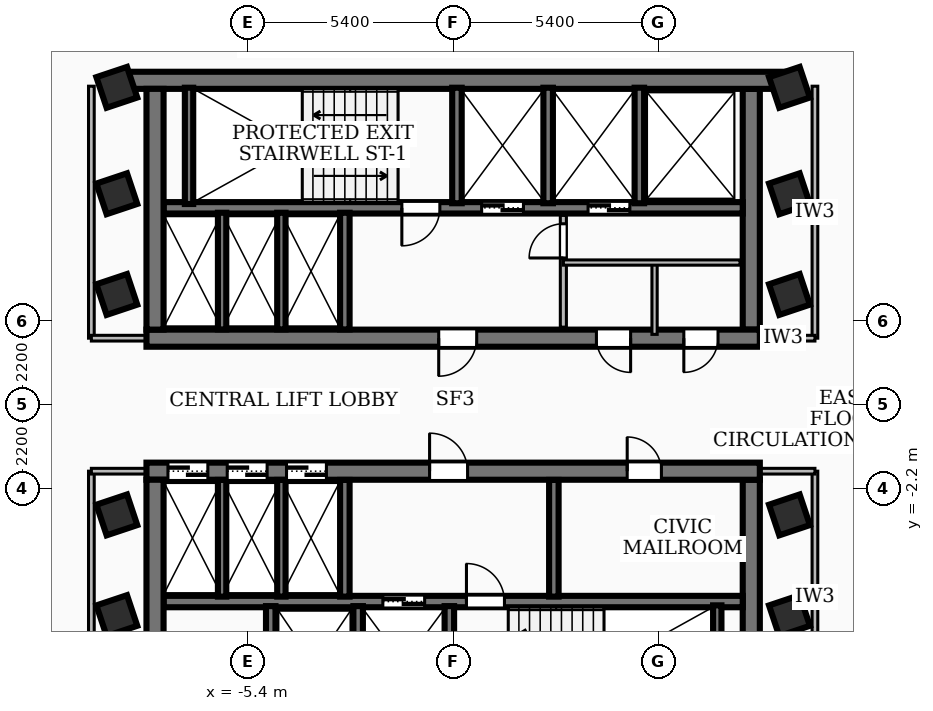
"""IFC4 building model, lengths in metres.
Left out: names, types, materials, properties, quantities, classifications, styles, units other than length and angle.
Written with IfcOpenShell. Run it as: python <this file> out.ifc"""

import sys

from ifc_helpers import new_model, si_unit, direction, frame, frame_2d, origin, origin_2d, place, context, subcontext, project, spatial, rectangle, extrude, element, fill, save


model = new_model("IFC4")
c1 = context("Model", 3, precision=1e-05, world=origin(), true_north=direction((0.0, 1.0)))
c2 = subcontext(c1, "Body", "Model", "MODEL_VIEW")
j1 = project(units=[si_unit("LENGTHUNIT", "METRE"), si_unit("PLANEANGLEUNIT", "RADIAN")], contexts=[c1])
p1 = place(None, origin())
s1 = spatial("IfcSite", under=j1, at=p1, CompositionType="ELEMENT")
p2 = place(p1, origin())
s2 = spatial("IfcBuilding", under=s1, at=p2, CompositionType="ELEMENT")
p3 = place(p2, frame((0.0, 0.0, 155.88)))
s3 = spatial("IfcBuildingStorey", under=s2, at=p3, CompositionType="ELEMENT", Elevation=155.88)
p4 = place(p3, frame((-8.78, 8.535, 0.0), z_axis=(0.0, 0.0, 1.0), x_axis=(1.0, 0.0, 0.0)))
e1 = element("IfcWall", 1, at=p4, inside=s3, PredefinedType="SHEAR", context=c2, shape_type="SweptSolid", body=[
    extrude(rectangle(XDim=17.56, YDim=0.45, at=frame_2d((8.78, 0.0))), origin(), (0.0, 0.0, 1.0), 3.34),
])
p5 = place(p3, frame((8.07, 1.75, 0.0), z_axis=(0.0, 0.0, 1.0), x_axis=(-1.0, 0.0, 0.0)))
e2 = element("IfcWall", 2, at=p5, inside=s3, PredefinedType="SHEAR", context=c2, shape_type="SweptSolid", body=[
    extrude(rectangle(XDim=16.14, YDim=0.45, at=frame_2d((8.07, 0.0))), origin(), (0.0, 0.0, 1.0), 3.34),
])
p6 = place(p5, frame((7.45, 0.0, 0.0)))
e3 = element("IfcOpeningElement", 3, at=p6, cuts=e2, PredefinedType="OPENING", context=c2, shape_type="SweptSolid", body=[
    extrude(rectangle(XDim=1.0, YDim=2.1, at=frame_2d((0.5, 1.05))), frame((0.0, 0.235, 0.0), z_axis=(0.0, -1.0, 0.0), x_axis=(1.0, 0.0, 0.0)), (0.0, 0.0, 1.0), 0.47),
])
p7 = place(p5, frame((3.4, 0.0, 0.0)))
e4 = element("IfcOpeningElement", 4, at=p7, cuts=e2, PredefinedType="OPENING", context=c2, shape_type="SweptSolid", body=[
    extrude(rectangle(XDim=0.9, YDim=2.06, at=frame_2d((0.45, 1.03))), frame((0.0, 0.235, 0.0), z_axis=(0.0, -1.0, 0.0), x_axis=(1.0, 0.0, 0.0)), (0.0, 0.0, 1.0), 0.47),
])
p8 = place(p5, frame((1.1, 0.0, 0.0)))
e5 = element("IfcOpeningElement", 5, at=p8, cuts=e2, PredefinedType="OPENING", context=c2, shape_type="SweptSolid", body=[
    extrude(rectangle(XDim=0.9, YDim=2.06, at=frame_2d((0.45, 1.03))), frame((0.0, 0.235, 0.0), z_axis=(0.0, -1.0, 0.0), x_axis=(1.0, 0.0, 0.0)), (0.0, 0.0, 1.0), 0.47),
])
for number, where, z_axis, x_axis in (
    (6, (-7.845, 1.975, 0.0), (0.0, 0.0, 1.0), (0.0, 1.0, 0.0)),
    (7, (7.845, 8.31, 0.0), (0.0, 0.0, 1.0), (0.0, -1.0, 0.0)),
):
    element("IfcWall", number, at=place(p3, frame(where, z_axis=z_axis, x_axis=x_axis)), inside=s3, PredefinedType="SHEAR", context=c2, shape_type="SweptSolid", body=[
        extrude(rectangle(XDim=6.335, YDim=0.45, at=frame_2d((3.167, 0.0))), origin(), (0.0, 0.0, 1.0), 3.34),
    ])
p9 = place(p3, frame((7.62, 5.18, 0.0), z_axis=(0.0, 0.0, 1.0), x_axis=(-1.0, 0.0, 0.0)))
e8 = element("IfcWall", 8, at=p9, inside=s3, PredefinedType="SOLIDWALL", context=c2, shape_type="SweptSolid", body=[
    extrude(rectangle(XDim=15.24, YDim=0.3, at=frame_2d((7.62, 0.0))), origin(), (0.0, 0.0, 1.0), 3.34),
])
p10 = place(p9, frame((5.77, 0.0, 0.0)))
e9 = element("IfcOpeningElement", 9, at=p10, cuts=e8, PredefinedType="OPENING", context=c2, shape_type="SweptSolid", body=[
    extrude(rectangle(XDim=1.1, YDim=2.15, at=frame_2d((0.55, 1.075))), frame((0.0, 0.16, 0.0), z_axis=(0.0, -1.0, 0.0), x_axis=(1.0, 0.0, 0.0)), (0.0, 0.0, 1.0), 0.32),
])
p11 = place(p9, frame((2.97, 0.0, 0.0)))
e10 = element("IfcOpeningElement", 10, at=p11, cuts=e8, PredefinedType="OPENING", context=c2, shape_type="SweptSolid", body=[
    extrude(rectangle(XDim=1.1, YDim=2.15, at=frame_2d((0.55, 1.075))), frame((0.0, 0.16, 0.0), z_axis=(0.0, -1.0, 0.0), x_axis=(1.0, 0.0, 0.0)), (0.0, 0.0, 1.0), 0.32),
])
p12 = place(p9, frame((7.97, 0.0, 0.0)))
e11 = element("IfcOpeningElement", 11, at=p12, cuts=e8, PredefinedType="OPENING", context=c2, shape_type="SweptSolid", body=[
    extrude(rectangle(XDim=1.0, YDim=2.1, at=frame_2d((0.5, 1.05))), frame((0.0, 0.16, 0.0), z_axis=(0.0, -1.0, 0.0), x_axis=(1.0, 0.0, 0.0)), (0.0, 0.0, 1.0), 0.32),
])
p13 = place(p3, frame((-8.07, -1.75, 0.0), z_axis=(0.0, 0.0, 1.0), x_axis=(1.0, 0.0, 0.0)))
e12 = element("IfcWall", 12, at=p13, inside=s3, PredefinedType="SHEAR", context=c2, shape_type="SweptSolid", body=[
    extrude(rectangle(XDim=16.14, YDim=0.45, at=frame_2d((8.07, 0.0))), origin(), (0.0, 0.0, 1.0), 3.34),
])
p14 = place(p13, frame((7.45, 0.0, 0.0)))
e13 = element("IfcOpeningElement", 13, at=p14, cuts=e12, PredefinedType="OPENING", context=c2, shape_type="SweptSolid", body=[
    extrude(rectangle(XDim=1.0, YDim=2.1, at=frame_2d((0.5, 1.05))), frame((0.0, 0.235, 0.0), z_axis=(0.0, -1.0, 0.0), x_axis=(1.0, 0.0, 0.0)), (0.0, 0.0, 1.0), 0.47),
])
p15 = place(p13, frame((12.65, 0.0, 0.0)))
e14 = element("IfcOpeningElement", 14, at=p15, cuts=e12, PredefinedType="OPENING", context=c2, shape_type="SweptSolid", body=[
    extrude(rectangle(XDim=0.9, YDim=2.06, at=frame_2d((0.45, 1.03))), frame((0.0, 0.235, 0.0), z_axis=(0.0, -1.0, 0.0), x_axis=(1.0, 0.0, 0.0)), (0.0, 0.0, 1.0), 0.47),
])
p16 = place(p13, frame((0.565, 0.0, 0.0)))
e15 = element("IfcOpeningElement", 15, at=p16, cuts=e12, PredefinedType="OPENING", context=c2, shape_type="SweptSolid", body=[
    extrude(rectangle(XDim=1.05, YDim=2.15, at=frame_2d((0.525, 1.075))), frame((0.0, 0.235, 0.0), z_axis=(0.0, -1.0, 0.0), x_axis=(1.0, 0.0, 0.0)), (0.0, 0.0, 1.0), 0.47),
])
p17 = place(p13, frame((2.125, 0.0, 0.0)))
e16 = element("IfcOpeningElement", 16, at=p17, cuts=e12, PredefinedType="OPENING", context=c2, shape_type="SweptSolid", body=[
    extrude(rectangle(XDim=1.05, YDim=2.15, at=frame_2d((0.525, 1.075))), frame((0.0, 0.235, 0.0), z_axis=(0.0, -1.0, 0.0), x_axis=(1.0, 0.0, 0.0)), (0.0, 0.0, 1.0), 0.47),
])
p18 = place(p13, frame((3.685, 0.0, 0.0)))
e17 = element("IfcOpeningElement", 17, at=p18, cuts=e12, PredefinedType="OPENING", context=c2, shape_type="SweptSolid", body=[
    extrude(rectangle(XDim=1.05, YDim=2.15, at=frame_2d((0.525, 1.075))), frame((0.0, 0.235, 0.0), z_axis=(0.0, -1.0, 0.0), x_axis=(1.0, 0.0, 0.0)), (0.0, 0.0, 1.0), 0.47),
])
for number, where, z_axis, x_axis in (
    (18, (-7.845, -8.31, 0.0), (0.0, 0.0, 1.0), (0.0, 1.0, 0.0)),
    (19, (7.845, -1.975, 0.0), (0.0, 0.0, 1.0), (0.0, -1.0, 0.0)),
):
    element("IfcWall", number, at=place(p3, frame(where, z_axis=z_axis, x_axis=x_axis)), inside=s3, PredefinedType="SHEAR", context=c2, shape_type="SweptSolid", body=[
        extrude(rectangle(XDim=6.335, YDim=0.45, at=frame_2d((3.167, 0.0))), origin(), (0.0, 0.0, 1.0), 3.34),
    ])
p19 = place(p3, frame((-7.62, -5.18, 0.0), z_axis=(0.0, 0.0, 1.0), x_axis=(1.0, 0.0, 0.0)))
e20 = element("IfcWall", 20, at=p19, inside=s3, PredefinedType="SOLIDWALL", context=c2, shape_type="SweptSolid", body=[
    extrude(rectangle(XDim=15.24, YDim=0.3, at=frame_2d((7.62, 0.0))), origin(), (0.0, 0.0, 1.0), 3.34),
])
p20 = place(p19, frame((5.77, 0.0, 0.0)))
e21 = element("IfcOpeningElement", 21, at=p20, cuts=e20, PredefinedType="OPENING", context=c2, shape_type="SweptSolid", body=[
    extrude(rectangle(XDim=1.1, YDim=2.15, at=frame_2d((0.55, 1.075))), frame((0.0, 0.16, 0.0), z_axis=(0.0, -1.0, 0.0), x_axis=(1.0, 0.0, 0.0)), (0.0, 0.0, 1.0), 0.32),
])
p21 = place(p19, frame((7.97, 0.0, 0.0)))
e22 = element("IfcOpeningElement", 22, at=p21, cuts=e20, PredefinedType="OPENING", context=c2, shape_type="SweptSolid", body=[
    extrude(rectangle(XDim=1.0, YDim=2.1, at=frame_2d((0.5, 1.05))), frame((0.0, 0.16, 0.0), z_axis=(0.0, -1.0, 0.0), x_axis=(1.0, 0.0, 0.0)), (0.0, 0.0, 1.0), 0.32),
])
for number, where, z_axis, x_axis in (
    (23, (-6.95, 5.28, 0.0), (0.0, 0.0, 1.0), (0.0, 1.0, 0.0)),
    (24, (6.95, -8.34, 0.0), (0.0, 0.0, 1.0), (0.0, 1.0, 0.0)),
):
    element("IfcWall", number, at=place(p3, frame(where, z_axis=z_axis, x_axis=x_axis)), inside=s3, PredefinedType="SOLIDWALL", context=c2, shape_type="SweptSolid", body=[
        extrude(rectangle(XDim=3.06, YDim=0.22, at=frame_2d((1.53, 0.0))), origin(), (0.0, 0.0, 1.0), 3.34),
    ])
for number, where, z_axis, x_axis in (
    (25, (0.1, 5.3, 0.0), (0.0, 0.0, 1.0), (0.0, 1.0, 0.0)),
    (26, (2.5, 5.3, 0.0), (0.0, 0.0, 1.0), (0.0, 1.0, 0.0)),
    (27, (4.9, 5.3, 0.0), (0.0, 0.0, 1.0), (0.0, 1.0, 0.0)),
):
    element("IfcWall", number, at=place(p3, frame(where, z_axis=z_axis, x_axis=x_axis)), inside=s3, PredefinedType="SOLIDWALL", context=c2, shape_type="SweptSolid", body=[
        extrude(rectangle(XDim=3.04, YDim=0.25, at=frame_2d((1.52, 0.0))), origin(), (0.0, 0.0, 1.0), 3.34),
    ])
p22 = place(p3, frame((-2.85, 1.98, 0.0), z_axis=(0.0, 0.0, 1.0), x_axis=(0.0, 1.0, 0.0)))
e28 = element("IfcWall", 28, at=p22, inside=s3, PredefinedType="SOLIDWALL", context=c2, shape_type="SweptSolid", body=[
    extrude(rectangle(XDim=3.07, YDim=0.25, at=frame_2d((1.535, 0.0))), origin(), (0.0, 0.0, 1.0), 3.34),
])
for number, where, z_axis, x_axis in (
    (29, (-0.1, -8.34, 0.0), (0.0, 0.0, 1.0), (0.0, 1.0, 0.0)),
    (30, (-2.5, -8.34, 0.0), (0.0, 0.0, 1.0), (0.0, 1.0, 0.0)),
    (31, (-4.8, -8.34, 0.0), (0.0, 0.0, 1.0), (0.0, 1.0, 0.0)),
):
    element("IfcWall", number, at=place(p3, frame(where, z_axis=z_axis, x_axis=x_axis)), inside=s3, PredefinedType="SOLIDWALL", context=c2, shape_type="SweptSolid", body=[
        extrude(rectangle(XDim=3.04, YDim=0.25, at=frame_2d((1.52, 0.0))), origin(), (0.0, 0.0, 1.0), 3.34),
    ])
for number, where, z_axis, x_axis in (
    (32, (-2.85, -5.05, 0.0), (0.0, 0.0, 1.0), (0.0, 1.0, 0.0)),
    (33, (2.65, -5.05, 0.0), (0.0, 0.0, 1.0), (0.0, 1.0, 0.0)),
):
    element("IfcWall", number, at=place(p3, frame(where, z_axis=z_axis, x_axis=x_axis)), inside=s3, PredefinedType="SOLIDWALL", context=c2, shape_type="SweptSolid", body=[
        extrude(rectangle(XDim=3.07, YDim=0.25, at=frame_2d((1.535, 0.0))), origin(), (0.0, 0.0, 1.0), 3.34),
    ])
for number, where, z_axis, x_axis in (
    (34, (-6.08, 1.98, 0.0), (0.0, 0.0, 1.0), (0.0, 1.0, 0.0)),
    (35, (-4.52, 1.98, 0.0), (0.0, 0.0, 1.0), (0.0, 1.0, 0.0)),
    (36, (-6.08, -5.05, 0.0), (0.0, 0.0, 1.0), (0.0, 1.0, 0.0)),
    (37, (-4.52, -5.05, 0.0), (0.0, 0.0, 1.0), (0.0, 1.0, 0.0)),
):
    element("IfcWall", number, at=place(p3, frame(where, z_axis=z_axis, x_axis=x_axis)), inside=s3, PredefinedType="SOLIDWALL", context=c2, shape_type="SweptSolid", body=[
        extrude(rectangle(XDim=3.07, YDim=0.22, at=frame_2d((1.535, 0.0))), origin(), (0.0, 0.0, 1.0), 3.34),
    ])
for number, where, z_axis, x_axis in (
    (38, (-8.85, -5.55, 0.0), (0.0, 0.0, 1.0), (0.948, 0.317, 0.0)),
    (39, (-8.85, -2.9, 0.0), (0.0, 0.0, 1.0), (0.948, 0.317, 0.0)),
    (40, (-8.85, 2.9, 0.0), (0.0, 0.0, 1.0), (0.948, 0.317, 0.0)),
    (41, (-8.85, 5.55, 0.0), (0.0, 0.0, 1.0), (0.948, 0.317, 0.0)),
    (42, (8.85, -5.55, 0.0), (0.0, 0.0, 1.0), (0.948, 0.317, 0.0)),
    (43, (8.85, -2.9, 0.0), (0.0, 0.0, 1.0), (0.948, 0.317, 0.0)),
    (44, (8.85, 2.9, 0.0), (0.0, 0.0, 1.0), (0.948, 0.317, 0.0)),
    (45, (8.85, 5.55, 0.0), (0.0, 0.0, 1.0), (0.948, 0.317, 0.0)),
    (46, (-8.85, 8.35, 0.0), (0.0, 0.0, 1.0), (0.948, 0.317, 0.0)),
    (47, (8.85, 8.35, 0.0), (0.0, 0.0, 1.0), (0.948, 0.317, 0.0)),
):
    element("IfcColumn", number, at=place(p3, frame(where, z_axis=z_axis, x_axis=x_axis)), inside=s3, PredefinedType="COLUMN", context=c2, shape_type="SweptSolid", body=[
        extrude(rectangle(XDim=0.85, YDim=0.85, at=origin_2d()), origin(), (0.0, 0.0, 1.0), 3.6),
    ])
p23 = place(p3, frame((2.9, 2.04, 0.0), z_axis=(0.0, 0.0, 1.0), x_axis=(0.0, 1.0, 0.0)))
e48 = element("IfcWall", 48, at=p23, inside=s3, PredefinedType="PARTITIONING", context=c2, shape_type="SweptSolid", body=[
    extrude(rectangle(XDim=2.94, YDim=0.16, at=frame_2d((1.47, 0.0))), origin(), (0.0, 0.0, 1.0), 2.57),
])
p24 = place(p23, frame((1.82, 0.0, 0.0)))
e49 = element("IfcOpeningElement", 49, at=p24, cuts=e48, PredefinedType="OPENING", context=c2, shape_type="SweptSolid", body=[
    extrude(rectangle(XDim=0.9, YDim=2.06, at=frame_2d((0.45, 1.03))), frame((0.0, 0.09, 0.0), z_axis=(0.0, -1.0, 0.0), x_axis=(1.0, 0.0, 0.0)), (0.0, 0.0, 1.0), 0.18),
])
p25 = place(p3, frame((2.9, 3.74, 0.0), z_axis=(0.0, 0.0, 1.0), x_axis=(1.0, 0.0, 0.0)))
e50 = element("IfcWall", 50, at=p25, inside=s3, PredefinedType="PARTITIONING", context=c2, shape_type="SweptSolid", body=[
    extrude(rectangle(XDim=4.65, YDim=0.138, at=frame_2d((2.325, 0.0))), origin(), (0.0, 0.0, 1.0), 3.34),
])
p26 = place(p3, frame((5.3, 1.85, 0.0), z_axis=(0.0, 0.0, 1.0), x_axis=(0.0, 1.0, 0.0)))
e51 = element("IfcWall", 51, at=p26, inside=s3, PredefinedType="PARTITIONING", context=c2, shape_type="SweptSolid", body=[
    extrude(rectangle(XDim=1.89, YDim=0.138, at=frame_2d((0.945, 0.0))), origin(), (0.0, 0.0, 1.0), 2.57),
])
p27 = place(p3, frame((-9.52, 1.75, 0.0), z_axis=(0.0, 0.0, 1.0), x_axis=(0.0, 1.0, 0.0)))
e52 = element("IfcWall", 52, at=p27, inside=s3, PredefinedType="PARTITIONING", context=c2, shape_type="SweptSolid", body=[
    extrude(rectangle(XDim=6.63, YDim=0.15, at=frame_2d((3.315, 0.0))), origin(), (0.0, 0.0, 1.0), 3.34),
])
p28 = place(p3, frame((-7.85, 1.75, 0.0), z_axis=(0.0, 0.0, 1.0), x_axis=(-1.0, 0.0, 0.0)))
e53 = element("IfcWall", 53, at=p28, inside=s3, PredefinedType="PARTITIONING", context=c2, shape_type="SweptSolid", body=[
    extrude(rectangle(XDim=1.67, YDim=0.15, at=frame_2d((0.835, 0.0))), origin(), (0.0, 0.0, 1.0), 2.57),
])
p29 = place(p3, frame((-9.52, -8.38, 0.0), z_axis=(0.0, 0.0, 1.0), x_axis=(0.0, 1.0, 0.0)))
e54 = element("IfcWall", 54, at=p29, inside=s3, PredefinedType="PARTITIONING", context=c2, shape_type="SweptSolid", body=[
    extrude(rectangle(XDim=6.63, YDim=0.15, at=frame_2d((3.315, 0.0))), origin(), (0.0, 0.0, 1.0), 2.644),
])
p30 = place(p3, frame((-7.85, -1.75, 0.0), z_axis=(0.0, 0.0, 1.0), x_axis=(-1.0, 0.0, 0.0)))
e55 = element("IfcWall", 55, at=p30, inside=s3, PredefinedType="PARTITIONING", context=c2, shape_type="SweptSolid", body=[
    extrude(rectangle(XDim=1.67, YDim=0.15, at=frame_2d((0.835, 0.0))), origin(), (0.0, 0.0, 1.0), 2.57),
])
p31 = place(p3, frame((9.52, 1.75, 0.0), z_axis=(0.0, 0.0, 1.0), x_axis=(0.0, 1.0, 0.0)))
e56 = element("IfcWall", 56, at=p31, inside=s3, PredefinedType="PARTITIONING", context=c2, shape_type="SweptSolid", body=[
    extrude(rectangle(XDim=6.63, YDim=0.15, at=frame_2d((3.315, 0.0))), origin(), (0.0, 0.0, 1.0), 2.644),
])
p32 = place(p3, frame((7.85, 1.75, 0.0), z_axis=(0.0, 0.0, 1.0), x_axis=(1.0, 0.0, 0.0)))
e57 = element("IfcWall", 57, at=p32, inside=s3, PredefinedType="PARTITIONING", context=c2, shape_type="SweptSolid", body=[
    extrude(rectangle(XDim=1.67, YDim=0.15, at=frame_2d((0.835, 0.0))), origin(), (0.0, 0.0, 1.0), 2.57),
])
p33 = place(p3, frame((9.52, -8.38, 0.0), z_axis=(0.0, 0.0, 1.0), x_axis=(0.0, 1.0, 0.0)))
e58 = element("IfcWall", 58, at=p33, inside=s3, PredefinedType="PARTITIONING", context=c2, shape_type="SweptSolid", body=[
    extrude(rectangle(XDim=6.63, YDim=0.15, at=frame_2d((3.315, 0.0))), origin(), (0.0, 0.0, 1.0), 3.34),
])
p34 = place(p3, frame((7.85, -1.75, 0.0), z_axis=(0.0, 0.0, 1.0), x_axis=(1.0, 0.0, 0.0)))
e59 = element("IfcWall", 59, at=p34, inside=s3, PredefinedType="PARTITIONING", context=c2, shape_type="SweptSolid", body=[
    extrude(rectangle(XDim=1.67, YDim=0.15, at=frame_2d((0.835, 0.0))), origin(), (0.0, 0.0, 1.0), 2.57),
])
p35 = place(p3, frame((10.372, 14.037, 0.0), z_axis=(0.0, 0.0, 1.0), x_axis=(0.317298382655, -0.94832575435, 0.0)))
e60 = element("IfcWall", 60, at=p35, inside=s3, PredefinedType="PARTITIONING", context=c2, shape_type="SweptSolid", body=[
    extrude(rectangle(XDim=20.041, YDim=0.145, at=frame_2d((10.021, 0.0))), origin(), (0.0, 0.0, 1.0), 2.644),
])
p36 = place(p35, frame((9.42, 0.0, 0.0)))
e61 = element("IfcOpeningElement", 61, at=p36, cuts=e60, PredefinedType="OPENING", context=c2, shape_type="SweptSolid", body=[
    extrude(rectangle(XDim=1.2, YDim=2.1, at=frame_2d((0.6, 1.05))), frame((0.0, 0.083, 0.0), z_axis=(0.0, -1.0, 0.0), x_axis=(1.0, 0.0, 0.0)), (0.0, 0.0, 1.0), 0.165),
])
p37 = place(p3, frame((-10.372, -14.037, 0.0), z_axis=(0.0, 0.0, 1.0), x_axis=(-0.317298382655, 0.94832575435, 0.0)))
e62 = element("IfcWall", 62, at=p37, inside=s3, PredefinedType="PARTITIONING", context=c2, shape_type="SweptSolid", body=[
    extrude(rectangle(XDim=20.041, YDim=0.145, at=frame_2d((10.021, 0.0))), origin(), (0.0, 0.0, 1.0), 2.644),
])
p38 = place(p37, frame((9.42, 0.0, 0.0)))
e63 = element("IfcOpeningElement", 63, at=p38, cuts=e62, PredefinedType="OPENING", context=c2, shape_type="SweptSolid", body=[
    extrude(rectangle(XDim=1.2, YDim=2.1, at=frame_2d((0.6, 1.05))), frame((0.0, 0.083, 0.0), z_axis=(0.0, -1.0, 0.0), x_axis=(1.0, 0.0, 0.0)), (0.0, 0.0, 1.0), 0.165),
])
p39 = place(p6, origin())
e64 = element("IfcDoor", 64, at=p39, inside=s3, OperationType="SINGLE_SWING_RIGHT", PredefinedType="DOOR", context=c2, shape_type="SweptSolid", body=[
    extrude(rectangle(XDim=1.0, YDim=2.1, at=frame_2d((0.5, 1.05))), frame((0.0, 0.025, 0.0), z_axis=(0.0, -1.0, 0.0), x_axis=(1.0, 0.0, 0.0)), (0.0, 0.0, 1.0), 0.05),
])
fill(e3, e64)
p40 = place(p14, origin())
e65 = element("IfcDoor", 65, at=p40, inside=s3, OperationType="SINGLE_SWING_LEFT", PredefinedType="DOOR", context=c2, shape_type="SweptSolid", body=[
    extrude(rectangle(XDim=1.0, YDim=2.1, at=frame_2d((0.5, 1.05))), frame((0.0, 0.025, 0.0), z_axis=(0.0, -1.0, 0.0), x_axis=(1.0, 0.0, 0.0)), (0.0, 0.0, 1.0), 0.05),
])
fill(e13, e65)
p41 = place(p10, origin())
e66 = element("IfcDoor", 66, at=p41, inside=s3, OperationType="DOUBLE_DOOR_SLIDING", PredefinedType="DOOR", context=c2, shape_type="SweptSolid", body=[
    extrude(rectangle(XDim=1.1, YDim=2.15, at=frame_2d((0.55, 1.075))), frame((0.0, 0.025, 0.0), z_axis=(0.0, -1.0, 0.0), x_axis=(1.0, 0.0, 0.0)), (0.0, 0.0, 1.0), 0.05),
])
fill(e9, e66)
p42 = place(p11, origin())
e67 = element("IfcDoor", 67, at=p42, inside=s3, OperationType="DOUBLE_DOOR_SLIDING", PredefinedType="DOOR", context=c2, shape_type="SweptSolid", body=[
    extrude(rectangle(XDim=1.1, YDim=2.15, at=frame_2d((0.55, 1.075))), frame((0.0, 0.025, 0.0), z_axis=(0.0, -1.0, 0.0), x_axis=(1.0, 0.0, 0.0)), (0.0, 0.0, 1.0), 0.05),
])
fill(e10, e67)
p43 = place(p12, origin())
e68 = element("IfcDoor", 68, at=p43, inside=s3, OperationType="SINGLE_SWING_RIGHT", PredefinedType="DOOR", context=c2, shape_type="SweptSolid", body=[
    extrude(rectangle(XDim=1.0, YDim=2.1, at=frame_2d((0.5, 1.05))), frame((0.0, 0.025, 0.0), z_axis=(0.0, -1.0, 0.0), x_axis=(1.0, 0.0, 0.0)), (0.0, 0.0, 1.0), 0.05),
])
fill(e11, e68)
p44 = place(p20, origin())
e69 = element("IfcDoor", 69, at=p44, inside=s3, OperationType="DOUBLE_DOOR_SLIDING", PredefinedType="DOOR", context=c2, shape_type="SweptSolid", body=[
    extrude(rectangle(XDim=1.1, YDim=2.15, at=frame_2d((0.55, 1.075))), frame((0.0, 0.025, 0.0), z_axis=(0.0, -1.0, 0.0), x_axis=(1.0, 0.0, 0.0)), (0.0, 0.0, 1.0), 0.05),
])
fill(e21, e69)
p45 = place(p21, origin())
e70 = element("IfcDoor", 70, at=p45, inside=s3, OperationType="SINGLE_SWING_LEFT", PredefinedType="DOOR", context=c2, shape_type="SweptSolid", body=[
    extrude(rectangle(XDim=1.0, YDim=2.1, at=frame_2d((0.5, 1.05))), frame((0.0, 0.025, 0.0), z_axis=(0.0, -1.0, 0.0), x_axis=(1.0, 0.0, 0.0)), (0.0, 0.0, 1.0), 0.05),
])
fill(e22, e70)
p46 = place(p15, origin())
e71 = element("IfcDoor", 71, at=p46, inside=s3, OperationType="SINGLE_SWING_LEFT", PredefinedType="DOOR", context=c2, shape_type="SweptSolid", body=[
    extrude(rectangle(XDim=0.9, YDim=2.06, at=frame_2d((0.45, 1.03))), frame((0.0, 0.025, 0.0), z_axis=(0.0, -1.0, 0.0), x_axis=(1.0, 0.0, 0.0)), (0.0, 0.0, 1.0), 0.05),
])
fill(e14, e71)
p47 = place(p16, origin())
e72 = element("IfcDoor", 72, at=p47, inside=s3, OperationType="DOUBLE_DOOR_SLIDING", PredefinedType="DOOR", context=c2, shape_type="SweptSolid", body=[
    extrude(rectangle(XDim=1.05, YDim=2.15, at=frame_2d((0.525, 1.075))), frame((0.0, 0.025, 0.0), z_axis=(0.0, -1.0, 0.0), x_axis=(1.0, 0.0, 0.0)), (0.0, 0.0, 1.0), 0.05),
])
fill(e15, e72)
p48 = place(p17, origin())
e73 = element("IfcDoor", 73, at=p48, inside=s3, OperationType="DOUBLE_DOOR_SLIDING", PredefinedType="DOOR", context=c2, shape_type="SweptSolid", body=[
    extrude(rectangle(XDim=1.05, YDim=2.15, at=frame_2d((0.525, 1.075))), frame((0.0, 0.025, 0.0), z_axis=(0.0, -1.0, 0.0), x_axis=(1.0, 0.0, 0.0)), (0.0, 0.0, 1.0), 0.05),
])
fill(e16, e73)
p49 = place(p18, origin())
e74 = element("IfcDoor", 74, at=p49, inside=s3, OperationType="DOUBLE_DOOR_SLIDING", PredefinedType="DOOR", context=c2, shape_type="SweptSolid", body=[
    extrude(rectangle(XDim=1.05, YDim=2.15, at=frame_2d((0.525, 1.075))), frame((0.0, 0.025, 0.0), z_axis=(0.0, -1.0, 0.0), x_axis=(1.0, 0.0, 0.0)), (0.0, 0.0, 1.0), 0.05),
])
fill(e17, e74)
p50 = place(p7, origin())
e75 = element("IfcDoor", 75, at=p50, inside=s3, OperationType="SINGLE_SWING_LEFT", PredefinedType="DOOR", context=c2, shape_type="SweptSolid", body=[
    extrude(rectangle(XDim=0.9, YDim=2.06, at=frame_2d((0.45, 1.03))), frame((0.0, 0.025, 0.0), z_axis=(0.0, -1.0, 0.0), x_axis=(1.0, 0.0, 0.0)), (0.0, 0.0, 1.0), 0.05),
])
fill(e4, e75)
p51 = place(p8, origin())
e76 = element("IfcDoor", 76, at=p51, inside=s3, OperationType="SINGLE_SWING_RIGHT", PredefinedType="DOOR", context=c2, shape_type="SweptSolid", body=[
    extrude(rectangle(XDim=0.9, YDim=2.06, at=frame_2d((0.45, 1.03))), frame((0.0, 0.025, 0.0), z_axis=(0.0, -1.0, 0.0), x_axis=(1.0, 0.0, 0.0)), (0.0, 0.0, 1.0), 0.05),
])
fill(e5, e76)
p52 = place(p24, origin())
e77 = element("IfcDoor", 77, at=p52, inside=s3, OperationType="SINGLE_SWING_LEFT", PredefinedType="DOOR", context=c2, shape_type="SweptSolid", body=[
    extrude(rectangle(XDim=0.9, YDim=2.06, at=frame_2d((0.45, 1.03))), frame((0.0, 0.025, 0.0), z_axis=(0.0, -1.0, 0.0), x_axis=(1.0, 0.0, 0.0)), (0.0, 0.0, 1.0), 0.05),
])
fill(e49, e77)
save(model, sys.argv[1])
